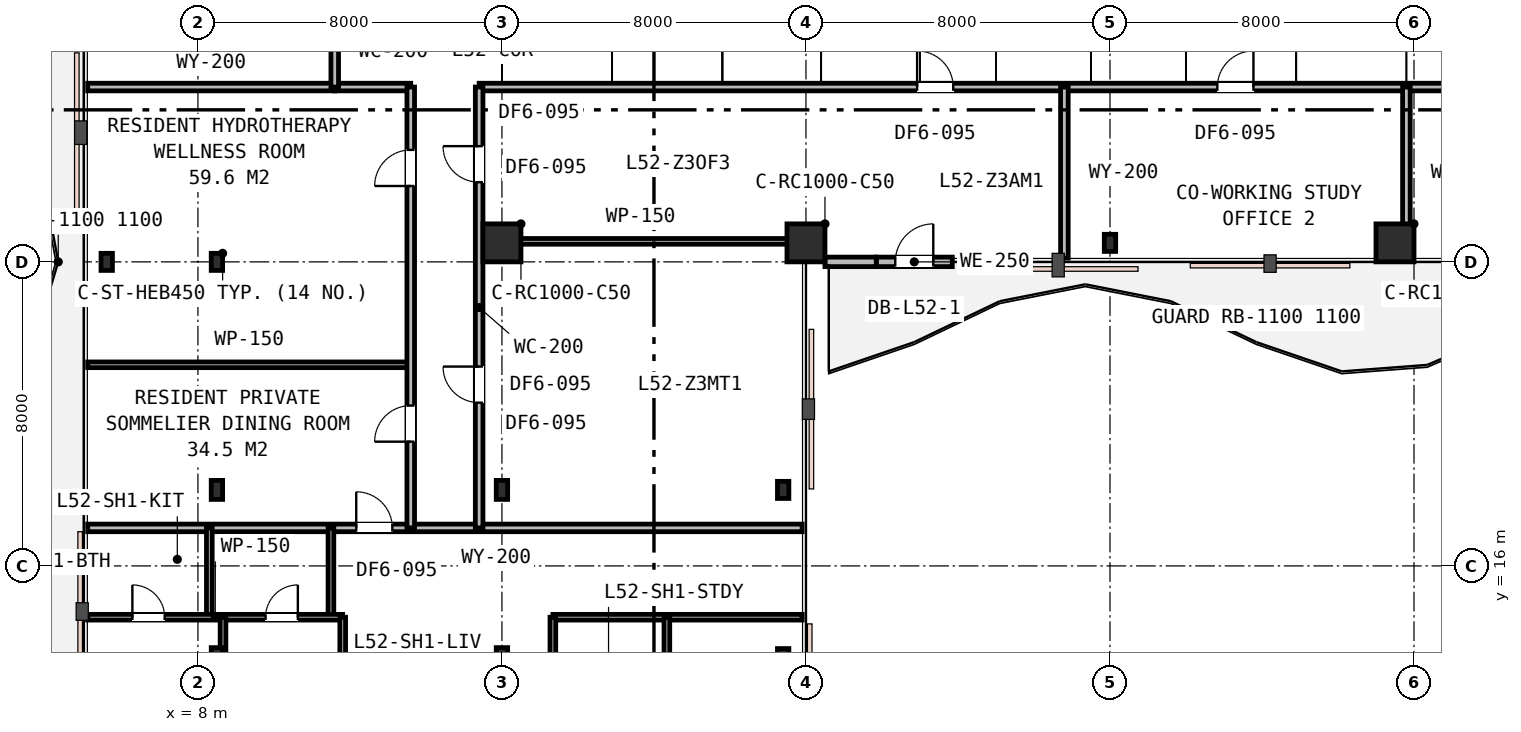
"""IFC4 building model, lengths in metres.
Left out: names, types, materials, properties, quantities, classifications, styles, units other than length and angle.
Written with IfcOpenShell. Run it as: python <this file> out.ifc"""

import sys

from ifc_helpers import new_model, si_unit, direction, frame, frame_2d, origin, origin_2d, place, context, subcontext, project, spatial, rectangle, i_section, extrude, element, fill, save


model = new_model("IFC4")
c1 = context("Model", 3, precision=1e-05, world=origin(), true_north=direction((0.0, 1.0)))
c2 = subcontext(c1, "Body", "Model", "MODEL_VIEW")
j1 = project(units=[si_unit("LENGTHUNIT", "METRE"), si_unit("PLANEANGLEUNIT", "RADIAN")], contexts=[c1])
p1 = place(None, origin())
s1 = spatial("IfcSite", under=j1, at=p1, CompositionType="ELEMENT")
p2 = place(p1, origin())
s2 = spatial("IfcBuilding", under=s1, at=p2, CompositionType="ELEMENT")
p3 = place(p2, frame((0.0, 0.0, 201.0)))
s3 = spatial("IfcBuildingStorey", under=s2, at=p3, CompositionType="ELEMENT", Elevation=201.0)
p4 = place(p3, frame((8.5, 24.0, 0.0), z_axis=(0.0, 0.0, 1.0), x_axis=(1.0, 0.0, 0.0)))
e1 = element("IfcColumn", 1, at=p4, inside=s3, PredefinedType="COLUMN", context=c2, shape_type="SweptSolid", body=[
    extrude(i_section(OverallWidth=0.3, OverallDepth=0.45, WebThickness=0.014, FlangeThickness=0.026, FilletRadius=0.027, at=origin_2d()), origin(), (0.0, 0.0, 1.0), 3.6),
])
for number, where, z_axis, x_axis in (
    (2, (16.0, 24.5, 0.0), (0.0, 0.0, 1.0), (1.0, 0.0, 0.0)),
    (3, (24.0, 24.5, 0.0), (0.0, 0.0, 1.0), (1.0, 0.0, 0.0)),
):
    element("IfcColumn", number, at=place(p3, frame(where, z_axis=z_axis, x_axis=x_axis)), inside=s3, PredefinedType="COLUMN", context=c2, shape_type="SweptSolid", body=[
        extrude(rectangle(XDim=1.0, YDim=1.0, at=origin_2d()), origin(), (0.0, 0.0, 1.0), 3.6),
    ])
p5 = place(p3, frame((32.0, 24.5, 0.0), z_axis=(0.0, 0.0, 1.0), x_axis=(1.0, 0.0, 0.0)))
e4 = element("IfcColumn", 4, at=p5, inside=s3, PredefinedType="COLUMN", context=c2, shape_type="SweptSolid", body=[
    extrude(i_section(OverallWidth=0.3, OverallDepth=0.45, WebThickness=0.014, FlangeThickness=0.026, FilletRadius=0.027, at=origin_2d()), origin(), (0.0, 0.0, 1.0), 3.6),
])
p6 = place(p3, frame((39.5, 24.5, 0.0), z_axis=(0.0, 0.0, 1.0), x_axis=(1.0, 0.0, 0.0)))
e5 = element("IfcColumn", 5, at=p6, inside=s3, PredefinedType="COLUMN", context=c2, shape_type="SweptSolid", body=[
    extrude(rectangle(XDim=1.0, YDim=1.0, at=origin_2d()), origin(), (0.0, 0.0, 1.0), 3.6),
])
for number, where, z_axis, x_axis in (
    (6, (5.6, 24.0, 0.0), (0.0, 0.0, 1.0), (1.0, 0.0, 0.0)),
    (7, (23.4, 13.6, 0.0), (0.0, 0.0, 1.0), (1.0, 0.0, 0.0)),
    (8, (23.4, 18.0, 0.0), (0.0, 0.0, 1.0), (1.0, 0.0, 0.0)),
):
    element("IfcColumn", number, at=place(p3, frame(where, z_axis=z_axis, x_axis=x_axis)), inside=s3, PredefinedType="COLUMN", context=c2, shape_type="SweptSolid", body=[
        extrude(i_section(OverallWidth=0.3, OverallDepth=0.45, WebThickness=0.014, FlangeThickness=0.026, FilletRadius=0.027, at=origin_2d()), origin(), (0.0, 0.0, 1.0), 3.6),
    ])
for number, where, z_axis, x_axis in (
    (9, (8.5, 13.6, 0.0), (0.0, 0.0, 1.0), (1.0, 0.0, 0.0)),
    (10, (16.0, 13.6, 0.0), (0.0, 0.0, 1.0), (1.0, 0.0, 0.0)),
    (11, (8.5, 18.0, 0.0), (0.0, 0.0, 1.0), (1.0, 0.0, 0.0)),
    (12, (16.0, 18.0, 0.0), (0.0, 0.0, 1.0), (1.0, 0.0, 0.0)),
):
    element("IfcColumn", number, at=place(p3, frame(where, z_axis=z_axis, x_axis=x_axis)), inside=s3, PredefinedType="COLUMN", context=c2, shape_type="SweptSolid", body=[
        extrude(i_section(OverallWidth=0.3, OverallDepth=0.5, WebThickness=0.015, FlangeThickness=0.028, FilletRadius=0.027, at=origin_2d()), origin(), (0.0, 0.0, 1.0), 3.6),
    ])
p7 = place(p3, frame((25.85, 24.0, 0.0), z_axis=(0.0, 0.0, 1.0), x_axis=(1.0, 0.0, 0.0)))
e13 = element("IfcWall", 13, at=p7, inside=s3, PredefinedType="STANDARD", context=c2, shape_type="SweptSolid", body=[
    extrude(rectangle(XDim=2.0, YDim=0.25, at=frame_2d((1.0, 0.0))), origin(), (0.0, 0.0, 1.0), 3.04),
])
p8 = place(p7, frame((0.5, 0.0, 0.0)))
e14 = element("IfcOpeningElement", 14, at=p8, cuts=e13, PredefinedType="OPENING", context=c2, shape_type="SweptSolid", body=[
    extrude(rectangle(XDim=1.0, YDim=2.15, at=frame_2d((0.5, 1.075))), frame((0.0, 0.135, 0.0), z_axis=(0.0, -1.0, 0.0), x_axis=(1.0, 0.0, 0.0)), (0.0, 0.0, 1.0), 0.27),
])
p9 = place(p3, frame((24.5, 24.0, 0.0), z_axis=(0.0, 0.0, 1.0), x_axis=(1.0, 0.0, 0.0)))
e15 = element("IfcWall", 15, at=p9, inside=s3, PredefinedType="STANDARD", context=c2, shape_type="SweptSolid", body=[
    extrude(rectangle(XDim=1.35, YDim=0.25, at=frame_2d((0.675, 0.0))), origin(), (0.0, 0.0, 1.0), 3.04),
])
p10 = place(p3, frame((5.1, 28.6, 0.0), z_axis=(0.0, 0.0, 1.0), x_axis=(1.0, 0.0, 0.0)))
e16 = element("IfcWall", 16, at=p10, inside=s3, PredefinedType="PARTITIONING", context=c2, shape_type="SweptSolid", body=[
    extrude(rectangle(XDim=6.5, YDim=0.2, at=frame_2d((3.25, 0.0))), origin(), (0.0, 0.0, 1.0), 2.72),
])
p11 = place(p3, frame((11.6, 28.6, 0.0), z_axis=(0.0, 0.0, 1.0), x_axis=(1.0, 0.0, 0.0)))
e17 = element("IfcWall", 17, at=p11, inside=s3, PredefinedType="PARTITIONING", context=c2, shape_type="SweptSolid", body=[
    extrude(rectangle(XDim=2.0, YDim=0.2, at=frame_2d((1.0, 0.0))), origin(), (0.0, 0.0, 1.0), 3.33),
])
p12 = place(p3, frame((15.4, 28.6, 0.0), z_axis=(0.0, 0.0, 1.0), x_axis=(1.0, 0.0, 0.0)))
e18 = element("IfcWall", 18, at=p12, inside=s3, PredefinedType="PARTITIONING", context=c2, shape_type="SweptSolid", body=[
    extrude(rectangle(XDim=35.5, YDim=0.2, at=frame_2d((17.75, 0.0))), origin(), (0.0, 0.0, 1.0), 2.72),
])
p13 = place(p12, frame((11.525, 0.0, 0.0)))
e19 = element("IfcOpeningElement", 19, at=p13, cuts=e18, PredefinedType="OPENING", context=c2, shape_type="SweptSolid", body=[
    extrude(rectangle(XDim=0.95, YDim=2.15, at=frame_2d((0.475, 1.075))), frame((0.0, 0.11, 0.0), z_axis=(0.0, -1.0, 0.0), x_axis=(1.0, 0.0, 0.0)), (0.0, 0.0, 1.0), 0.22),
])
p14 = place(p12, frame((19.425, 0.0, 0.0)))
e20 = element("IfcOpeningElement", 20, at=p14, cuts=e18, PredefinedType="OPENING", context=c2, shape_type="SweptSolid", body=[
    extrude(rectangle(XDim=0.95, YDim=2.15, at=frame_2d((0.475, 1.075))), frame((0.0, 0.11, 0.0), z_axis=(0.0, -1.0, 0.0), x_axis=(1.0, 0.0, 0.0)), (0.0, 0.0, 1.0), 0.22),
])
p15 = place(p12, frame((26.275, 0.0, 0.0)))
e21 = element("IfcOpeningElement", 21, at=p15, cuts=e18, PredefinedType="OPENING", context=c2, shape_type="SweptSolid", body=[
    extrude(rectangle(XDim=0.95, YDim=2.15, at=frame_2d((0.475, 1.075))), frame((0.0, 0.11, 0.0), z_axis=(0.0, -1.0, 0.0), x_axis=(1.0, 0.0, 0.0)), (0.0, 0.0, 1.0), 0.22),
])
p16 = place(p3, frame((11.6, 28.6, 0.0), z_axis=(0.0, 0.0, 1.0), x_axis=(0.0, 1.0, 0.0)))
e22 = element("IfcWall", 22, at=p16, inside=s3, PredefinedType="PARTITIONING", context=c2, shape_type="SweptSolid", body=[
    extrude(rectangle(XDim=7.4, YDim=0.2, at=frame_2d((3.7, 0.0))), origin(), (0.0, 0.0, 1.0), 2.72),
])
p17 = place(p16, frame((4.325, 0.0, 0.0)))
e23 = element("IfcOpeningElement", 23, at=p17, cuts=e22, PredefinedType="OPENING", context=c2, shape_type="SweptSolid", body=[
    extrude(rectangle(XDim=0.95, YDim=2.15, at=frame_2d((0.475, 1.075))), frame((0.0, 0.11, 0.0), z_axis=(0.0, -1.0, 0.0), x_axis=(1.0, 0.0, 0.0)), (0.0, 0.0, 1.0), 0.22),
])
p18 = place(p3, frame((30.8, 24.1, 0.0), z_axis=(0.0, 0.0, 1.0), x_axis=(0.0, 1.0, 0.0)))
e24 = element("IfcWall", 24, at=p18, inside=s3, PredefinedType="PARTITIONING", context=c2, shape_type="SweptSolid", body=[
    extrude(rectangle(XDim=4.5, YDim=0.2, at=frame_2d((2.25, 0.0))), origin(), (0.0, 0.0, 1.0), 3.04),
])
p19 = place(p3, frame((39.8, 24.1, 0.0), z_axis=(0.0, 0.0, 1.0), x_axis=(0.0, 1.0, 0.0)))
e25 = element("IfcWall", 25, at=p19, inside=s3, PredefinedType="PARTITIONING", context=c2, shape_type="SweptSolid", body=[
    extrude(rectangle(XDim=4.5, YDim=0.2, at=frame_2d((2.25, 0.0))), origin(), (0.0, 0.0, 1.0), 2.72),
])
p20 = place(p3, frame((5.1, 17.0, 0.0), z_axis=(0.0, 0.0, 1.0), x_axis=(1.0, 0.0, 0.0)))
e26 = element("IfcWall", 26, at=p20, inside=s3, PredefinedType="PARTITIONING", context=c2, shape_type="SweptSolid", body=[
    extrude(rectangle(XDim=18.8, YDim=0.2, at=frame_2d((9.4, 0.0))), origin(), (0.0, 0.0, 1.0), 2.72),
])
p21 = place(p20, frame((7.066, 0.0, 0.0)))
e27 = element("IfcOpeningElement", 27, at=p21, cuts=e26, PredefinedType="OPENING", context=c2, shape_type="SweptSolid", body=[
    extrude(rectangle(XDim=0.95, YDim=2.15, at=frame_2d((0.475, 1.075))), frame((0.0, 0.11, 0.0), z_axis=(0.0, -1.0, 0.0), x_axis=(1.0, 0.0, 0.0)), (0.0, 0.0, 1.0), 0.22),
])
p22 = place(p3, frame((5.1, 21.292, 0.0), z_axis=(0.0, 0.0, 1.0), x_axis=(1.0, 0.0, 0.0)))
e28 = element("IfcWall", 28, at=p22, inside=s3, PredefinedType="PARTITIONING", context=c2, shape_type="SweptSolid", body=[
    extrude(rectangle(XDim=8.5, YDim=0.15, at=frame_2d((4.25, 0.0))), origin(), (0.0, 0.0, 1.0), 2.72),
])
p23 = place(p3, frame((13.6, 17.0, 0.0), z_axis=(0.0, 0.0, 1.0), x_axis=(0.0, 1.0, 0.0)))
e29 = element("IfcWall", 29, at=p23, inside=s3, PredefinedType="PARTITIONING", context=c2, shape_type="SweptSolid", body=[
    extrude(rectangle(XDim=11.6, YDim=0.2, at=frame_2d((5.8, 0.0))), origin(), (0.0, 0.0, 1.0), 2.72),
])
p24 = place(p23, frame((8.996, 0.0, 0.0)))
e30 = element("IfcOpeningElement", 30, at=p24, cuts=e29, PredefinedType="OPENING", context=c2, shape_type="SweptSolid", body=[
    extrude(rectangle(XDim=0.95, YDim=2.15, at=frame_2d((0.475, 1.075))), frame((0.0, 0.11, 0.0), z_axis=(0.0, -1.0, 0.0), x_axis=(1.0, 0.0, 0.0)), (0.0, 0.0, 1.0), 0.22),
])
p25 = place(p23, frame((2.269, 0.0, 0.0)))
e31 = element("IfcOpeningElement", 31, at=p25, cuts=e29, PredefinedType="OPENING", context=c2, shape_type="SweptSolid", body=[
    extrude(rectangle(XDim=0.95, YDim=2.15, at=frame_2d((0.475, 1.075))), frame((0.0, 0.11, 0.0), z_axis=(0.0, -1.0, 0.0), x_axis=(1.0, 0.0, 0.0)), (0.0, 0.0, 1.0), 0.22),
])
p26 = place(p3, frame((15.4, 24.54, 0.0), z_axis=(0.0, 0.0, 1.0), x_axis=(1.0, 0.0, 0.0)))
e32 = element("IfcWall", 32, at=p26, inside=s3, PredefinedType="PARTITIONING", context=c2, shape_type="SweptSolid", body=[
    extrude(rectangle(XDim=8.5, YDim=0.15, at=frame_2d((4.25, 0.0))), origin(), (0.0, 0.0, 1.0), 2.72),
])
p27 = place(p3, frame((15.4, 17.0, 0.0), z_axis=(0.0, 0.0, 1.0), x_axis=(0.0, 1.0, 0.0)))
e33 = element("IfcWall", 33, at=p27, inside=s3, PredefinedType="PARTITIONING", context=c2, shape_type="SweptSolid", body=[
    extrude(rectangle(XDim=11.6, YDim=0.2, at=frame_2d((5.8, 0.0))), origin(), (0.0, 0.0, 1.0), 2.72),
])
p28 = place(p27, frame((9.095, 0.0, 0.0)))
e34 = element("IfcOpeningElement", 34, at=p28, cuts=e33, PredefinedType="OPENING", context=c2, shape_type="SweptSolid", body=[
    extrude(rectangle(XDim=0.95, YDim=2.15, at=frame_2d((0.475, 1.075))), frame((0.0, 0.11, 0.0), z_axis=(0.0, -1.0, 0.0), x_axis=(1.0, 0.0, 0.0)), (0.0, 0.0, 1.0), 0.22),
])
p29 = place(p27, frame((3.295, 0.0, 0.0)))
e35 = element("IfcOpeningElement", 35, at=p29, cuts=e33, PredefinedType="OPENING", context=c2, shape_type="SweptSolid", body=[
    extrude(rectangle(XDim=0.95, YDim=2.15, at=frame_2d((0.475, 1.075))), frame((0.0, 0.11, 0.0), z_axis=(0.0, -1.0, 0.0), x_axis=(1.0, 0.0, 0.0)), (0.0, 0.0, 1.0), 0.22),
])
p30 = place(p3, frame((11.5, 14.65, 0.0), z_axis=(0.0, 0.0, 1.0), x_axis=(0.0, 1.0, 0.0)))
e36 = element("IfcWall", 36, at=p30, inside=s3, PredefinedType="PARTITIONING", context=c2, shape_type="SweptSolid", body=[
    extrude(rectangle(XDim=2.35, YDim=0.15, at=frame_2d((1.175, 0.0))), origin(), (0.0, 0.0, 1.0), 3.02),
])
p31 = place(p3, frame((8.3, 14.65, 0.0), z_axis=(0.0, 0.0, 1.0), x_axis=(0.0, 1.0, 0.0)))
e37 = element("IfcWall", 37, at=p31, inside=s3, PredefinedType="PARTITIONING", context=c2, shape_type="SweptSolid", body=[
    extrude(rectangle(XDim=2.35, YDim=0.15, at=frame_2d((1.175, 0.0))), origin(), (0.0, 0.0, 1.0), 2.72),
])
p32 = place(p3, frame((5.1, 14.65, 0.0), z_axis=(0.0, 0.0, 1.0), x_axis=(1.0, 0.0, 0.0)))
e38 = element("IfcWall", 38, at=p32, inside=s3, PredefinedType="PARTITIONING", context=c2, shape_type="SweptSolid", body=[
    extrude(rectangle(XDim=6.71, YDim=0.15, at=frame_2d((3.355, 0.0))), origin(), (0.0, 0.0, 1.0), 2.72),
])
p33 = place(p32, frame((1.175, 0.0, 0.0)))
e39 = element("IfcOpeningElement", 39, at=p33, cuts=e38, PredefinedType="OPENING", context=c2, shape_type="SweptSolid", body=[
    extrude(rectangle(XDim=0.85, YDim=2.15, at=frame_2d((0.425, 1.075))), frame((0.0, 0.085, 0.0), z_axis=(0.0, -1.0, 0.0), x_axis=(1.0, 0.0, 0.0)), (0.0, 0.0, 1.0), 0.17),
])
p34 = place(p32, frame((4.679, 0.0, 0.0)))
e40 = element("IfcOpeningElement", 40, at=p34, cuts=e38, PredefinedType="OPENING", context=c2, shape_type="SweptSolid", body=[
    extrude(rectangle(XDim=0.85, YDim=2.15, at=frame_2d((0.425, 1.075))), frame((0.0, 0.085, 0.0), z_axis=(0.0, -1.0, 0.0), x_axis=(1.0, 0.0, 0.0)), (0.0, 0.0, 1.0), 0.17),
])
p35 = place(p3, frame((17.34, 14.65, 0.0), z_axis=(0.0, 0.0, 1.0), x_axis=(1.0, 0.0, 0.0)))
e41 = element("IfcWall", 41, at=p35, inside=s3, PredefinedType="PARTITIONING", context=c2, shape_type="SweptSolid", body=[
    extrude(rectangle(XDim=6.56, YDim=0.15, at=frame_2d((3.28, 0.0))), origin(), (0.0, 0.0, 1.0), 3.02),
])
p36 = place(p3, frame((8.66, 5.1, 0.0), z_axis=(0.0, 0.0, 1.0), x_axis=(0.0, 1.0, 0.0)))
e42 = element("IfcWall", 42, at=p36, inside=s3, PredefinedType="PARTITIONING", context=c2, shape_type="SweptSolid", body=[
    extrude(rectangle(XDim=9.55, YDim=0.15, at=frame_2d((4.775, 0.0))), origin(), (0.0, 0.0, 1.0), 2.72),
])
p37 = place(p36, frame((4.779, 0.0, 0.0)))
e43 = element("IfcOpeningElement", 43, at=p37, cuts=e42, PredefinedType="OPENING", context=c2, shape_type="SweptSolid", body=[
    extrude(rectangle(XDim=0.9, YDim=2.15, at=frame_2d((0.45, 1.075))), frame((0.0, 0.085, 0.0), z_axis=(0.0, -1.0, 0.0), x_axis=(1.0, 0.0, 0.0)), (0.0, 0.0, 1.0), 0.17),
])
p38 = place(p3, frame((20.34, 5.1, 0.0), z_axis=(0.0, 0.0, 1.0), x_axis=(0.0, 1.0, 0.0)))
e44 = element("IfcWall", 44, at=p38, inside=s3, PredefinedType="PARTITIONING", context=c2, shape_type="SweptSolid", body=[
    extrude(rectangle(XDim=9.55, YDim=0.15, at=frame_2d((4.775, 0.0))), origin(), (0.0, 0.0, 1.0), 2.72),
])
p39 = place(p38, frame((4.325, 0.0, 0.0)))
e45 = element("IfcOpeningElement", 45, at=p39, cuts=e44, PredefinedType="OPENING", context=c2, shape_type="SweptSolid", body=[
    extrude(rectangle(XDim=0.9, YDim=2.15, at=frame_2d((0.45, 1.075))), frame((0.0, 0.085, 0.0), z_axis=(0.0, -1.0, 0.0), x_axis=(1.0, 0.0, 0.0)), (0.0, 0.0, 1.0), 0.17),
])
p40 = place(p3, frame((17.34, 5.1, 0.0), z_axis=(0.0, 0.0, 1.0), x_axis=(0.0, 1.0, 0.0)))
e46 = element("IfcWall", 46, at=p40, inside=s3, PredefinedType="PARTITIONING", context=c2, shape_type="SweptSolid", body=[
    extrude(rectangle(XDim=9.55, YDim=0.15, at=frame_2d((4.775, 0.0))), origin(), (0.0, 0.0, 1.0), 2.72),
])
p41 = place(p40, frame((4.779, 0.0, 0.0)))
e47 = element("IfcOpeningElement", 47, at=p41, cuts=e46, PredefinedType="OPENING", context=c2, shape_type="SweptSolid", body=[
    extrude(rectangle(XDim=0.9, YDim=2.15, at=frame_2d((0.45, 1.075))), frame((0.0, 0.085, 0.0), z_axis=(0.0, -1.0, 0.0), x_axis=(1.0, 0.0, 0.0)), (0.0, 0.0, 1.0), 0.17),
])
p42 = place(p3, frame((11.81, 5.1, 0.0), z_axis=(0.0, 0.0, 1.0), x_axis=(0.0, 1.0, 0.0)))
e48 = element("IfcWall", 48, at=p42, inside=s3, PredefinedType="PARTITIONING", context=c2, shape_type="SweptSolid", body=[
    extrude(rectangle(XDim=9.55, YDim=0.15, at=frame_2d((4.775, 0.0))), origin(), (0.0, 0.0, 1.0), 2.72),
])
p43 = place(p42, frame((4.325, 0.0, 0.0)))
e49 = element("IfcOpeningElement", 49, at=p43, cuts=e48, PredefinedType="OPENING", context=c2, shape_type="SweptSolid", body=[
    extrude(rectangle(XDim=0.9, YDim=2.15, at=frame_2d((0.45, 1.075))), frame((0.0, 0.085, 0.0), z_axis=(0.0, -1.0, 0.0), x_axis=(1.0, 0.0, 0.0)), (0.0, 0.0, 1.0), 0.17),
])
p44 = place(p8, origin())
e50 = element("IfcDoor", 50, at=p44, inside=s3, OperationType="SINGLE_SWING_RIGHT", PredefinedType="DOOR", context=c2, shape_type="SweptSolid", body=[
    extrude(rectangle(XDim=1.0, YDim=2.15, at=frame_2d((0.5, 1.075))), frame((0.0, 0.025, 0.0), z_axis=(0.0, -1.0, 0.0), x_axis=(1.0, 0.0, 0.0)), (0.0, 0.0, 1.0), 0.05),
])
fill(e14, e50)
p45 = place(p13, origin())
e51 = element("IfcDoor", 51, at=p45, inside=s3, OperationType="SINGLE_SWING_LEFT", PredefinedType="DOOR", context=c2, shape_type="SweptSolid", body=[
    extrude(rectangle(XDim=0.95, YDim=2.15, at=frame_2d((0.475, 1.075))), frame((0.0, 0.025, 0.0), z_axis=(0.0, -1.0, 0.0), x_axis=(1.0, 0.0, 0.0)), (0.0, 0.0, 1.0), 0.05),
])
fill(e19, e51)
p46 = place(p14, origin())
e52 = element("IfcDoor", 52, at=p46, inside=s3, OperationType="SINGLE_SWING_RIGHT", PredefinedType="DOOR", context=c2, shape_type="SweptSolid", body=[
    extrude(rectangle(XDim=0.95, YDim=2.15, at=frame_2d((0.475, 1.075))), frame((0.0, 0.025, 0.0), z_axis=(0.0, -1.0, 0.0), x_axis=(1.0, 0.0, 0.0)), (0.0, 0.0, 1.0), 0.05),
])
fill(e20, e52)
p47 = place(p24, origin())
e53 = element("IfcDoor", 53, at=p47, inside=s3, OperationType="SINGLE_SWING_LEFT", PredefinedType="DOOR", context=c2, shape_type="SweptSolid", body=[
    extrude(rectangle(XDim=0.95, YDim=2.15, at=frame_2d((0.475, 1.075))), frame((0.0, 0.025, 0.0), z_axis=(0.0, -1.0, 0.0), x_axis=(1.0, 0.0, 0.0)), (0.0, 0.0, 1.0), 0.05),
])
fill(e30, e53)
p48 = place(p25, origin())
e54 = element("IfcDoor", 54, at=p48, inside=s3, OperationType="SINGLE_SWING_LEFT", PredefinedType="DOOR", context=c2, shape_type="SweptSolid", body=[
    extrude(rectangle(XDim=0.95, YDim=2.15, at=frame_2d((0.475, 1.075))), frame((0.0, 0.025, 0.0), z_axis=(0.0, -1.0, 0.0), x_axis=(1.0, 0.0, 0.0)), (0.0, 0.0, 1.0), 0.05),
])
fill(e31, e54)
p49 = place(p28, origin())
e55 = element("IfcDoor", 55, at=p49, inside=s3, OperationType="SINGLE_SWING_RIGHT", PredefinedType="DOOR", context=c2, shape_type="SweptSolid", body=[
    extrude(rectangle(XDim=0.95, YDim=2.15, at=frame_2d((0.475, 1.075))), frame((0.0, 0.025, 0.0), z_axis=(0.0, -1.0, 0.0), x_axis=(1.0, 0.0, 0.0)), (0.0, 0.0, 1.0), 0.05),
])
fill(e34, e55)
p50 = place(p29, origin())
e56 = element("IfcDoor", 56, at=p50, inside=s3, OperationType="SINGLE_SWING_RIGHT", PredefinedType="DOOR", context=c2, shape_type="SweptSolid", body=[
    extrude(rectangle(XDim=0.95, YDim=2.15, at=frame_2d((0.475, 1.075))), frame((0.0, 0.025, 0.0), z_axis=(0.0, -1.0, 0.0), x_axis=(1.0, 0.0, 0.0)), (0.0, 0.0, 1.0), 0.05),
])
fill(e35, e56)
p51 = place(p21, origin())
e57 = element("IfcDoor", 57, at=p51, inside=s3, OperationType="SINGLE_SWING_LEFT", PredefinedType="DOOR", context=c2, shape_type="SweptSolid", body=[
    extrude(rectangle(XDim=0.95, YDim=2.15, at=frame_2d((0.475, 1.075))), frame((0.0, 0.025, 0.0), z_axis=(0.0, -1.0, 0.0), x_axis=(1.0, 0.0, 0.0)), (0.0, 0.0, 1.0), 0.05),
])
fill(e27, e57)
p52 = place(p33, origin())
e58 = element("IfcDoor", 58, at=p52, inside=s3, OperationType="SINGLE_SWING_LEFT", PredefinedType="DOOR", context=c2, shape_type="SweptSolid", body=[
    extrude(rectangle(XDim=0.85, YDim=2.15, at=frame_2d((0.425, 1.075))), frame((0.0, 0.025, 0.0), z_axis=(0.0, -1.0, 0.0), x_axis=(1.0, 0.0, 0.0)), (0.0, 0.0, 1.0), 0.05),
])
fill(e39, e58)
p53 = place(p34, origin())
e59 = element("IfcDoor", 59, at=p53, inside=s3, OperationType="SINGLE_SWING_RIGHT", PredefinedType="DOOR", context=c2, shape_type="SweptSolid", body=[
    extrude(rectangle(XDim=0.85, YDim=2.15, at=frame_2d((0.425, 1.075))), frame((0.0, 0.025, 0.0), z_axis=(0.0, -1.0, 0.0), x_axis=(1.0, 0.0, 0.0)), (0.0, 0.0, 1.0), 0.05),
])
fill(e40, e59)
save(model, sys.argv[1])
